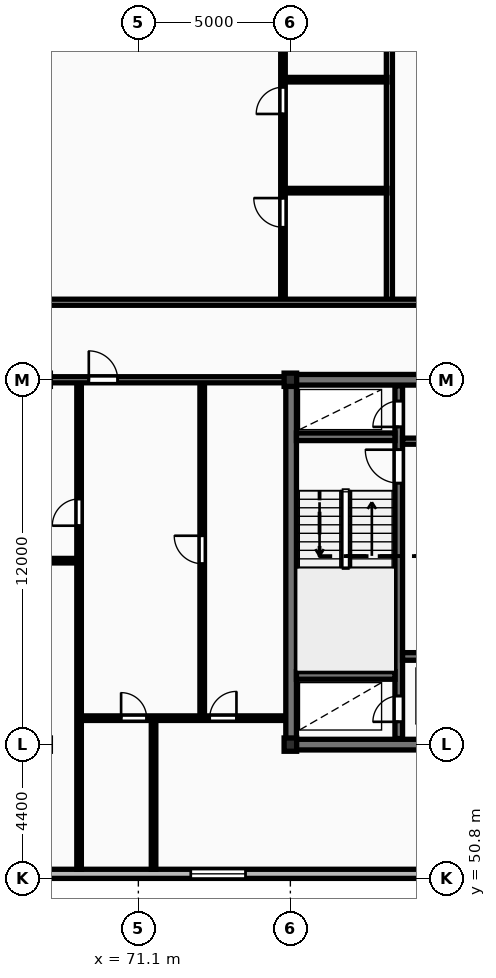
"""IFC4 building model, lengths in metres.
Left out: names, types, materials, properties, quantities, classifications, styles, units other than length and angle.
Written with IfcOpenShell. Run it as: python <this file> out.ifc"""

import sys

from ifc_helpers import new_model, si_unit, direction, frame, frame_2d, origin, origin_2d, place, context, subcontext, project, spatial, rectangle, i_section, extrude, element, fill, save


model = new_model("IFC4")
c1 = context("Model", 3, precision=1e-05, world=origin(), true_north=direction((0.0, 1.0)))
c2 = subcontext(c1, "Body", "Model", "MODEL_VIEW")
j1 = project(units=[si_unit("LENGTHUNIT", "METRE"), si_unit("PLANEANGLEUNIT", "RADIAN")], contexts=[c1])
p1 = place(None, origin())
s1 = spatial("IfcSite", under=j1, at=p1, CompositionType="ELEMENT")
p2 = place(p1, origin())
s2 = spatial("IfcBuilding", under=s1, at=p2, CompositionType="ELEMENT")
p3 = place(p2, frame((0.0, 0.0, 150.1)))
s3 = spatial("IfcBuildingStorey", under=s2, at=p3, CompositionType="ELEMENT", Elevation=150.1)
for number, where, z_axis, x_axis in (
    (1, (76.1, 55.2, 0.0), (0.0, 0.0, 1.0), (1.0, 0.0, 0.0)),
    (2, (76.1, 67.2, 0.0), (0.0, 0.0, 1.0), (1.0, 0.0, 0.0)),
):
    element("IfcColumn", number, at=place(p3, frame(where, z_axis=z_axis, x_axis=x_axis)), inside=s3, PredefinedType="COLUMN", context=c2, shape_type="SweptSolid", body=[
        extrude(i_section(OverallWidth=0.412, OverallDepth=0.437, WebThickness=0.036, FlangeThickness=0.052, FilletRadius=0.015, at=origin_2d()), origin(), (0.0, 0.0, 1.0), 3.6),
    ])
p4 = place(p3, frame((57.6, 50.95, 0.0), z_axis=(0.0, 0.0, 1.0), x_axis=(1.0, 0.0, 0.0)))
e3 = element("IfcWall", 3, at=p4, inside=s3, PredefinedType="STANDARD", context=c2, shape_type="SweptSolid", body=[
    extrude(rectangle(XDim=73.0, YDim=0.3, at=frame_2d((36.5, 0.0))), origin(), (0.0, 0.0, 1.0), 3.31),
])
p5 = place(p4, frame((15.225, 0.0, 0.85)))
e4 = element("IfcOpeningElement", 4, at=p5, cuts=e3, PredefinedType="OPENING", context=c2, shape_type="SweptSolid", body=[
    extrude(rectangle(XDim=1.8, YDim=1.8, at=frame_2d((0.9, 0.9))), frame((0.0, 0.16, 0.0), z_axis=(0.0, -1.0, 0.0), x_axis=(1.0, 0.0, 0.0)), (0.0, 0.0, 1.0), 0.32),
])
p6 = place(p4, frame((58.575, 0.0, 0.85)))
e5 = element("IfcOpeningElement", 5, at=p6, cuts=e3, PredefinedType="OPENING", context=c2, shape_type="SweptSolid", body=[
    extrude(rectangle(XDim=1.8, YDim=1.8, at=frame_2d((0.9, 0.9))), frame((0.0, 0.16, 0.0), z_axis=(0.0, -1.0, 0.0), x_axis=(1.0, 0.0, 0.0)), (0.0, 0.0, 1.0), 0.32),
])
p7 = place(p4, frame((33.45, 0.0, 0.0)))
e6 = element("IfcOpeningElement", 6, at=p7, cuts=e3, PredefinedType="OPENING", context=c2, shape_type="SweptSolid", body=[
    extrude(rectangle(XDim=1.1, YDim=2.1, at=frame_2d((0.55, 1.05))), frame((0.0, 0.16, 0.0), z_axis=(0.0, -1.0, 0.0), x_axis=(1.0, 0.0, 0.0)), (0.0, 0.0, 1.0), 0.32),
])
p8 = place(p3, frame((75.95, 55.2, 0.0), z_axis=(0.0, 0.0, 1.0), x_axis=(1.0, 0.0, 0.0)))
e7 = element("IfcWall", 7, at=p8, inside=s3, PredefinedType="SHEAR", context=c2, shape_type="SweptSolid", body=[
    extrude(rectangle(XDim=36.3, YDim=0.35, at=frame_2d((18.15, 0.0))), origin(), (0.0, 0.0, 1.0), 3.6),
])
p9 = place(p8, frame((15.1, 0.0, 0.0)))
e8 = element("IfcOpeningElement", 8, at=p9, cuts=e7, PredefinedType="OPENING", context=c2, shape_type="SweptSolid", body=[
    extrude(rectangle(XDim=1.1, YDim=2.1, at=frame_2d((0.55, 1.05))), frame((0.0, 0.185, 0.0), z_axis=(0.0, -1.0, 0.0), x_axis=(1.0, 0.0, 0.0)), (0.0, 0.0, 1.0), 0.37),
])
p10 = place(p3, frame((76.125, 55.375, 0.0), z_axis=(0.0, 0.0, 1.0), x_axis=(0.0, 1.0, 0.0)))
e9 = element("IfcWall", 9, at=p10, inside=s3, PredefinedType="SHEAR", context=c2, shape_type="SweptSolid", body=[
    extrude(rectangle(XDim=11.65, YDim=0.35, at=frame_2d((5.825, 0.0))), origin(), (0.0, 0.0, 1.0), 3.6),
])
p11 = place(p3, frame((75.95, 67.2, 0.0), z_axis=(0.0, 0.0, 1.0), x_axis=(1.0, 0.0, 0.0)))
e10 = element("IfcWall", 10, at=p11, inside=s3, PredefinedType="SHEAR", context=c2, shape_type="SweptSolid", body=[
    extrude(rectangle(XDim=36.3, YDim=0.35, at=frame_2d((18.15, 0.0))), origin(), (0.0, 0.0, 1.0), 3.6),
])
p12 = place(p11, frame((5.25, 0.0, 0.0)))
e11 = element("IfcOpeningElement", 11, at=p12, cuts=e10, PredefinedType="OPENING", context=c2, shape_type="SweptSolid", body=[
    extrude(rectangle(XDim=1.0, YDim=2.15, at=frame_2d((0.5, 1.075))), frame((0.0, 0.185, 0.0), z_axis=(0.0, -1.0, 0.0), x_axis=(1.0, 0.0, 0.0)), (0.0, 0.0, 1.0), 0.37),
])
p13 = place(p11, frame((21.6, 0.0, 0.0)))
e12 = element("IfcOpeningElement", 12, at=p13, cuts=e10, PredefinedType="OPENING", context=c2, shape_type="SweptSolid", body=[
    extrude(rectangle(XDim=1.5, YDim=2.2, at=frame_2d((0.75, 1.1))), frame((0.0, 0.185, 0.0), z_axis=(0.0, -1.0, 0.0), x_axis=(1.0, 0.0, 0.0)), (0.0, 0.0, 1.0), 0.37),
])
p14 = place(p11, frame((30.45, 0.0, 0.0)))
e13 = element("IfcOpeningElement", 13, at=p14, cuts=e10, PredefinedType="OPENING", context=c2, shape_type="SweptSolid", body=[
    extrude(rectangle(XDim=1.0, YDim=2.15, at=frame_2d((0.5, 1.075))), frame((0.0, 0.185, 0.0), z_axis=(0.0, -1.0, 0.0), x_axis=(1.0, 0.0, 0.0)), (0.0, 0.0, 1.0), 0.37),
])
p15 = place(p3, frame((79.665, 55.4, 0.0), z_axis=(0.0, 0.0, 1.0), x_axis=(0.0, 1.0, 0.0)))
e14 = element("IfcWall", 14, at=p15, inside=s3, PredefinedType="SHEAR", context=c2, shape_type="SweptSolid", body=[
    extrude(rectangle(XDim=11.6, YDim=0.25, at=frame_2d((5.8, 0.0))), origin(), (0.0, 0.0, 1.0), 3.6),
])
p16 = place(p15, frame((0.55, 0.0, 0.0)))
e15 = element("IfcOpeningElement", 15, at=p16, cuts=e14, PredefinedType="OPENING", context=c2, shape_type="SweptSolid", body=[
    extrude(rectangle(XDim=0.85, YDim=2.05, at=frame_2d((0.425, 1.025))), frame((0.0, 0.135, 0.0), z_axis=(0.0, -1.0, 0.0), x_axis=(1.0, 0.0, 0.0)), (0.0, 0.0, 1.0), 0.27),
])
p17 = place(p15, frame((8.4, 0.0, 0.0)))
e16 = element("IfcOpeningElement", 16, at=p17, cuts=e14, PredefinedType="OPENING", context=c2, shape_type="SweptSolid", body=[
    extrude(rectangle(XDim=1.1, YDim=2.1, at=frame_2d((0.55, 1.05))), frame((0.0, 0.135, 0.0), z_axis=(0.0, -1.0, 0.0), x_axis=(1.0, 0.0, 0.0)), (0.0, 0.0, 1.0), 0.27),
])
p18 = place(p15, frame((10.25, 0.0, 0.0)))
e17 = element("IfcOpeningElement", 17, at=p18, cuts=e14, PredefinedType="OPENING", context=c2, shape_type="SweptSolid", body=[
    extrude(rectangle(XDim=0.85, YDim=2.05, at=frame_2d((0.425, 1.025))), frame((0.0, 0.135, 0.0), z_axis=(0.0, -1.0, 0.0), x_axis=(1.0, 0.0, 0.0)), (0.0, 0.0, 1.0), 0.27),
])
for number, where, z_axis, x_axis in (
    (18, (76.3, 57.475, 0.0), (0.0, 0.0, 1.0), (1.0, 0.0, 0.0)),
    (19, (76.3, 65.325, 0.0), (0.0, 0.0, 1.0), (1.0, 0.0, 0.0)),
):
    element("IfcWall", number, at=place(p3, frame(where, z_axis=z_axis, x_axis=x_axis)), inside=s3, PredefinedType="SHEAR", context=c2, shape_type="SweptSolid", body=[
        extrude(rectangle(XDim=3.24, YDim=0.25, at=frame_2d((1.62, 0.0))), origin(), (0.0, 0.0, 1.0), 3.6),
    ])
p19 = place(p3, frame((79.79, 58.1, 0.0), z_axis=(0.0, 0.0, 1.0), x_axis=(1.0, 0.0, 0.0)))
e20 = element("IfcWall", 20, at=p19, inside=s3, PredefinedType="SHEAR", context=c2, shape_type="SweptSolid", body=[
    extrude(rectangle(XDim=4.39, YDim=0.25, at=frame_2d((2.195, 0.0))), origin(), (0.0, 0.0, 1.0), 3.6),
])
p20 = place(p19, frame((1.05, 0.0, 0.0)))
e21 = element("IfcOpeningElement", 21, at=p20, cuts=e20, PredefinedType="OPENING", context=c2, shape_type="SweptSolid", body=[
    extrude(rectangle(XDim=1.12, YDim=2.12, at=frame_2d((0.56, 1.06))), frame((0.0, 0.135, 0.0), z_axis=(0.0, -1.0, 0.0), x_axis=(1.0, 0.0, 0.0)), (0.0, 0.0, 1.0), 0.27),
])
p21 = place(p19, frame((3.26, 0.0, 0.0)))
e22 = element("IfcOpeningElement", 22, at=p21, cuts=e20, PredefinedType="OPENING", context=c2, shape_type="SweptSolid", body=[
    extrude(rectangle(XDim=0.85, YDim=2.05, at=frame_2d((0.425, 1.025))), frame((0.0, 0.135, 0.0), z_axis=(0.0, -1.0, 0.0), x_axis=(1.0, 0.0, 0.0)), (0.0, 0.0, 1.0), 0.27),
])
p22 = place(p3, frame((79.79, 65.18, 0.0), z_axis=(0.0, 0.0, 1.0), x_axis=(1.0, 0.0, 0.0)))
e23 = element("IfcWall", 23, at=p22, inside=s3, PredefinedType="PARTITIONING", context=c2, shape_type="SweptSolid", body=[
    extrude(rectangle(XDim=4.39, YDim=0.2, at=frame_2d((2.195, 0.0))), origin(), (0.0, 0.0, 1.0), 3.31),
])
p23 = place(p22, frame((1.5, 0.0, 0.0)))
e24 = element("IfcOpeningElement", 24, at=p23, cuts=e23, PredefinedType="OPENING", context=c2, shape_type="SweptSolid", body=[
    extrude(rectangle(XDim=1.1, YDim=2.1, at=frame_2d((0.55, 1.05))), frame((0.0, 0.11, 0.0), z_axis=(0.0, -1.0, 0.0), x_axis=(1.0, 0.0, 0.0)), (0.0, 0.0, 1.0), 0.22),
])
p24 = place(p3, frame((57.6, 61.25, 0.0), z_axis=(0.0, 0.0, 1.0), x_axis=(1.0, 0.0, 0.0)))
e25 = element("IfcWall", 25, at=p24, inside=s3, PredefinedType="PARTITIONING", context=c2, shape_type="SweptSolid", body=[
    extrude(rectangle(XDim=11.55, YDim=0.15, at=frame_2d((5.775, 0.0))), origin(), (0.0, 0.0, 1.0), 3.31),
])
p25 = place(p24, frame((5.355, 0.0, 0.0)))
e26 = element("IfcOpeningElement", 26, at=p25, cuts=e25, PredefinedType="OPENING", context=c2, shape_type="SweptSolid", body=[
    extrude(rectangle(XDim=0.84, YDim=2.04, at=frame_2d((0.42, 1.02))), frame((0.0, 0.085, 0.0), z_axis=(0.0, -1.0, 0.0), x_axis=(1.0, 0.0, 0.0)), (0.0, 0.0, 1.0), 0.17),
])
p26 = place(p3, frame((69.15, 51.1, 0.0), z_axis=(0.0, 0.0, 1.0), x_axis=(0.0, 1.0, 0.0)))
e27 = element("IfcWall", 27, at=p26, inside=s3, PredefinedType="PARTITIONING", context=c2, shape_type="SweptSolid", body=[
    extrude(rectangle(XDim=16.05, YDim=0.15, at=frame_2d((8.025, 0.0))), origin(), (0.0, 0.0, 1.0), 3.31),
])
p27 = place(p26, frame((11.3, 0.0, 0.0)))
e28 = element("IfcOpeningElement", 28, at=p27, cuts=e27, PredefinedType="OPENING", context=c2, shape_type="SweptSolid", body=[
    extrude(rectangle(XDim=0.88, YDim=2.06, at=frame_2d((0.44, 1.03))), frame((0.0, 0.085, 0.0), z_axis=(0.0, -1.0, 0.0), x_axis=(1.0, 0.0, 0.0)), (0.0, 0.0, 1.0), 0.17),
])
p28 = place(p3, frame((73.2, 56.07, 0.0), z_axis=(0.0, 0.0, 1.0), x_axis=(0.0, 1.0, 0.0)))
e29 = element("IfcWall", 29, at=p28, inside=s3, PredefinedType="PARTITIONING", context=c2, shape_type="SweptSolid", body=[
    extrude(rectangle(XDim=11.08, YDim=0.15, at=frame_2d((5.54, 0.0))), origin(), (0.0, 0.0, 1.0), 3.31),
])
p29 = place(p28, frame((5.08, 0.0, 0.0)))
e30 = element("IfcOpeningElement", 30, at=p29, cuts=e29, PredefinedType="OPENING", context=c2, shape_type="SweptSolid", body=[
    extrude(rectangle(XDim=0.92, YDim=2.08, at=frame_2d((0.46, 1.04))), frame((0.0, 0.085, 0.0), z_axis=(0.0, -1.0, 0.0), x_axis=(1.0, 0.0, 0.0)), (0.0, 0.0, 1.0), 0.17),
])
p30 = place(p3, frame((71.6, 51.1, 0.0), z_axis=(0.0, 0.0, 1.0), x_axis=(0.0, 1.0, 0.0)))
e31 = element("IfcWall", 31, at=p30, inside=s3, PredefinedType="PARTITIONING", context=c2, shape_type="SweptSolid", body=[
    extrude(rectangle(XDim=4.97, YDim=0.15, at=frame_2d((2.485, 0.0))), origin(), (0.0, 0.0, 1.0), 3.31),
])
p31 = place(p3, frame((69.17, 56.07, 0.0), z_axis=(0.0, 0.0, 1.0), x_axis=(1.0, 0.0, 0.0)))
e32 = element("IfcWall", 32, at=p31, inside=s3, PredefinedType="PARTITIONING", context=c2, shape_type="SweptSolid", body=[
    extrude(rectangle(XDim=6.76, YDim=0.15, at=frame_2d((3.38, 0.0))), origin(), (0.0, 0.0, 1.0), 3.31),
])
p32 = place(p31, frame((1.362, 0.0, 0.0)))
e33 = element("IfcOpeningElement", 33, at=p32, cuts=e32, PredefinedType="OPENING", context=c2, shape_type="SweptSolid", body=[
    extrude(rectangle(XDim=0.84, YDim=2.04, at=frame_2d((0.42, 1.02))), frame((0.0, 0.085, 0.0), z_axis=(0.0, -1.0, 0.0), x_axis=(1.0, 0.0, 0.0)), (0.0, 0.0, 1.0), 0.17),
])
p33 = place(p31, frame((4.277, 0.0, 0.0)))
e34 = element("IfcOpeningElement", 34, at=p33, cuts=e32, PredefinedType="OPENING", context=c2, shape_type="SweptSolid", body=[
    extrude(rectangle(XDim=0.88, YDim=2.06, at=frame_2d((0.44, 1.03))), frame((0.0, 0.085, 0.0), z_axis=(0.0, -1.0, 0.0), x_axis=(1.0, 0.0, 0.0)), (0.0, 0.0, 1.0), 0.17),
])
p34 = place(p3, frame((57.6, 67.2, 0.0), z_axis=(0.0, 0.0, 1.0), x_axis=(1.0, 0.0, 0.0)))
e35 = element("IfcWall", 35, at=p34, inside=s3, PredefinedType="PARTITIONING", context=c2, shape_type="SweptSolid", body=[
    extrude(rectangle(XDim=18.35, YDim=0.2, at=frame_2d((9.175, 0.0))), origin(), (0.0, 0.0, 1.0), 2.773),
])
p35 = place(p34, frame((11.87, 0.0, 0.0)))
e36 = element("IfcOpeningElement", 36, at=p35, cuts=e35, PredefinedType="OPENING", context=c2, shape_type="SweptSolid", body=[
    extrude(rectangle(XDim=0.95, YDim=2.15, at=frame_2d((0.475, 1.075))), frame((0.0, 0.11, 0.0), z_axis=(0.0, -1.0, 0.0), x_axis=(1.0, 0.0, 0.0)), (0.0, 0.0, 1.0), 0.22),
])
p36 = place(p3, frame((79.357, 69.83, 0.0), z_axis=(0.0, 0.0, 1.0), x_axis=(0.0, 1.0, 0.0)))
e37 = element("IfcWall", 37, at=p36, inside=s3, PredefinedType="PARTITIONING", context=c2, shape_type="SweptSolid", body=[
    extrude(rectangle(XDim=26.07, YDim=0.2, at=frame_2d((13.035, 0.0))), origin(), (0.0, 0.0, 1.0), 3.31),
])
for number, where, z_axis, x_axis in (
    (38, (75.917, 73.42, 0.0), (0.0, 0.0, 1.0), (1.0, 0.0, 0.0)),
    (39, (75.917, 77.07, 0.0), (0.0, 0.0, 1.0), (1.0, 0.0, 0.0)),
):
    element("IfcWall", number, at=place(p3, frame(where, z_axis=z_axis, x_axis=x_axis)), inside=s3, PredefinedType="PARTITIONING", context=c2, shape_type="SweptSolid", body=[
        extrude(rectangle(XDim=3.36, YDim=0.15, at=frame_2d((1.68, 0.0))), origin(), (0.0, 0.0, 1.0), 3.31),
    ])
p37 = place(p3, frame((75.857, 69.81, 0.0), z_axis=(0.0, 0.0, 1.0), x_axis=(0.0, 1.0, 0.0)))
e40 = element("IfcWall", 40, at=p37, inside=s3, PredefinedType="PARTITIONING", context=c2, shape_type="SweptSolid", body=[
    extrude(rectangle(XDim=21.48, YDim=0.15, at=frame_2d((10.74, 0.0))), origin(), (0.0, 0.0, 1.0), 2.617),
])
p38 = place(p37, frame((2.406, 0.0, 0.0)))
e41 = element("IfcOpeningElement", 41, at=p38, cuts=e40, PredefinedType="OPENING", context=c2, shape_type="SweptSolid", body=[
    extrude(rectangle(XDim=0.96, YDim=2.1, at=frame_2d((0.48, 1.05))), frame((0.0, 0.085, 0.0), z_axis=(0.0, -1.0, 0.0), x_axis=(1.0, 0.0, 0.0)), (0.0, 0.0, 1.0), 0.17),
])
p39 = place(p37, frame((6.133, 0.0, 0.0)))
e42 = element("IfcOpeningElement", 42, at=p39, cuts=e40, PredefinedType="OPENING", context=c2, shape_type="SweptSolid", body=[
    extrude(rectangle(XDim=0.88, YDim=2.06, at=frame_2d((0.44, 1.03))), frame((0.0, 0.085, 0.0), z_axis=(0.0, -1.0, 0.0), x_axis=(1.0, 0.0, 0.0)), (0.0, 0.0, 1.0), 0.17),
])
p40 = place(p37, frame((11.336, 0.0, 0.0)))
e43 = element("IfcOpeningElement", 43, at=p40, cuts=e40, PredefinedType="OPENING", context=c2, shape_type="SweptSolid", body=[
    extrude(rectangle(XDim=0.84, YDim=2.04, at=frame_2d((0.42, 1.02))), frame((0.0, 0.085, 0.0), z_axis=(0.0, -1.0, 0.0), x_axis=(1.0, 0.0, 0.0)), (0.0, 0.0, 1.0), 0.17),
])
p41 = place(p3, frame((57.6, 69.75, 0.0), z_axis=(0.0, 0.0, 1.0), x_axis=(1.0, 0.0, 0.0)))
e44 = element("IfcWall", 44, at=p41, inside=s3, PredefinedType="PARTITIONING", context=c2, shape_type="SweptSolid", body=[
    extrude(rectangle(XDim=73.0, YDim=0.2, at=frame_2d((36.5, 0.0))), origin(), (0.0, 0.0, 1.0), 3.31),
])
p42 = place(p41, frame((9.189, 0.0, 0.0)))
e45 = element("IfcOpeningElement", 45, at=p42, cuts=e44, PredefinedType="OPENING", context=c2, shape_type="SweptSolid", body=[
    extrude(rectangle(XDim=1.22, YDim=2.18, at=frame_2d((0.61, 1.09))), frame((0.0, 0.11, 0.0), z_axis=(0.0, -1.0, 0.0), x_axis=(1.0, 0.0, 0.0)), (0.0, 0.0, 1.0), 0.22),
])
p43 = place(p41, frame((29.912, 0.0, 0.0)))
e46 = element("IfcOpeningElement", 46, at=p43, cuts=e44, PredefinedType="OPENING", context=c2, shape_type="SweptSolid", body=[
    extrude(rectangle(XDim=1.22, YDim=2.18, at=frame_2d((0.61, 1.09))), frame((0.0, 0.11, 0.0), z_axis=(0.0, -1.0, 0.0), x_axis=(1.0, 0.0, 0.0)), (0.0, 0.0, 1.0), 0.22),
])
p44 = place(p41, frame((49.457, 0.0, 0.0)))
e47 = element("IfcOpeningElement", 47, at=p44, cuts=e44, PredefinedType="OPENING", context=c2, shape_type="SweptSolid", body=[
    extrude(rectangle(XDim=1.22, YDim=2.18, at=frame_2d((0.61, 1.09))), frame((0.0, 0.11, 0.0), z_axis=(0.0, -1.0, 0.0), x_axis=(1.0, 0.0, 0.0)), (0.0, 0.0, 1.0), 0.22),
])
p45 = place(p41, frame((63.122, 0.0, 0.0)))
e48 = element("IfcOpeningElement", 48, at=p45, cuts=e44, PredefinedType="OPENING", context=c2, shape_type="SweptSolid", body=[
    extrude(rectangle(XDim=0.95, YDim=2.15, at=frame_2d((0.475, 1.075))), frame((0.0, 0.11, 0.0), z_axis=(0.0, -1.0, 0.0), x_axis=(1.0, 0.0, 0.0)), (0.0, 0.0, 1.0), 0.22),
])
p46 = place(p5, origin())
e49 = element("IfcWindow", 49, at=p46, inside=s3, PartitioningType="SINGLE_PANEL", PredefinedType="WINDOW", context=c2, shape_type="SweptSolid", body=[
    extrude(rectangle(XDim=1.8, YDim=1.8, at=frame_2d((0.9, 0.9))), frame((0.0, 0.03, 0.0), z_axis=(0.0, -1.0, 0.0), x_axis=(1.0, 0.0, 0.0)), (0.0, 0.0, 1.0), 0.06),
])
fill(e4, e49)
p47 = place(p16, origin())
e50 = element("IfcDoor", 50, at=p47, inside=s3, OperationType="SINGLE_SWING_LEFT", PredefinedType="DOOR", context=c2, shape_type="SweptSolid", body=[
    extrude(rectangle(XDim=0.85, YDim=2.05, at=frame_2d((0.425, 1.025))), frame((0.0, 0.025, 0.0), z_axis=(0.0, -1.0, 0.0), x_axis=(1.0, 0.0, 0.0)), (0.0, 0.0, 1.0), 0.05),
])
fill(e15, e50)
p48 = place(p17, origin())
e51 = element("IfcDoor", 51, at=p48, inside=s3, OperationType="SINGLE_SWING_RIGHT", PredefinedType="DOOR", context=c2, shape_type="SweptSolid", body=[
    extrude(rectangle(XDim=1.1, YDim=2.1, at=frame_2d((0.55, 1.05))), frame((0.0, 0.025, 0.0), z_axis=(0.0, -1.0, 0.0), x_axis=(1.0, 0.0, 0.0)), (0.0, 0.0, 1.0), 0.05),
])
fill(e16, e51)
p49 = place(p18, origin())
e52 = element("IfcDoor", 52, at=p49, inside=s3, OperationType="SINGLE_SWING_LEFT", PredefinedType="DOOR", context=c2, shape_type="SweptSolid", body=[
    extrude(rectangle(XDim=0.85, YDim=2.05, at=frame_2d((0.425, 1.025))), frame((0.0, 0.025, 0.0), z_axis=(0.0, -1.0, 0.0), x_axis=(1.0, 0.0, 0.0)), (0.0, 0.0, 1.0), 0.05),
])
fill(e17, e52)
p50 = place(p27, origin())
e53 = element("IfcDoor", 53, at=p50, inside=s3, OperationType="SINGLE_SWING_LEFT", PredefinedType="DOOR", context=c2, shape_type="SweptSolid", body=[
    extrude(rectangle(XDim=0.88, YDim=2.06, at=frame_2d((0.44, 1.03))), frame((0.0, 0.025, 0.0), z_axis=(0.0, -1.0, 0.0), x_axis=(1.0, 0.0, 0.0)), (0.0, 0.0, 1.0), 0.05),
])
fill(e28, e53)
p51 = place(p29, origin())
e54 = element("IfcDoor", 54, at=p51, inside=s3, OperationType="SINGLE_SWING_RIGHT", PredefinedType="DOOR", context=c2, shape_type="SweptSolid", body=[
    extrude(rectangle(XDim=0.92, YDim=2.08, at=frame_2d((0.46, 1.04))), frame((0.0, 0.025, 0.0), z_axis=(0.0, -1.0, 0.0), x_axis=(1.0, 0.0, 0.0)), (0.0, 0.0, 1.0), 0.05),
])
fill(e30, e54)
p52 = place(p32, origin())
e55 = element("IfcDoor", 55, at=p52, inside=s3, OperationType="SINGLE_SWING_LEFT", PredefinedType="DOOR", context=c2, shape_type="SweptSolid", body=[
    extrude(rectangle(XDim=0.84, YDim=2.04, at=frame_2d((0.42, 1.02))), frame((0.0, 0.025, 0.0), z_axis=(0.0, -1.0, 0.0), x_axis=(1.0, 0.0, 0.0)), (0.0, 0.0, 1.0), 0.05),
])
fill(e33, e55)
p53 = place(p33, origin())
e56 = element("IfcDoor", 56, at=p53, inside=s3, OperationType="SINGLE_SWING_RIGHT", PredefinedType="DOOR", context=c2, shape_type="SweptSolid", body=[
    extrude(rectangle(XDim=0.88, YDim=2.06, at=frame_2d((0.44, 1.03))), frame((0.0, 0.025, 0.0), z_axis=(0.0, -1.0, 0.0), x_axis=(1.0, 0.0, 0.0)), (0.0, 0.0, 1.0), 0.05),
])
fill(e34, e56)
p54 = place(p35, origin())
e57 = element("IfcDoor", 57, at=p54, inside=s3, OperationType="SINGLE_SWING_LEFT", PredefinedType="DOOR", context=c2, shape_type="SweptSolid", body=[
    extrude(rectangle(XDim=0.95, YDim=2.15, at=frame_2d((0.475, 1.075))), frame((0.0, 0.025, 0.0), z_axis=(0.0, -1.0, 0.0), x_axis=(1.0, 0.0, 0.0)), (0.0, 0.0, 1.0), 0.05),
])
fill(e36, e57)
p55 = place(p38, origin())
e58 = element("IfcDoor", 58, at=p55, inside=s3, OperationType="SINGLE_SWING_RIGHT", PredefinedType="DOOR", context=c2, shape_type="SweptSolid", body=[
    extrude(rectangle(XDim=0.96, YDim=2.1, at=frame_2d((0.48, 1.05))), frame((0.0, 0.025, 0.0), z_axis=(0.0, -1.0, 0.0), x_axis=(1.0, 0.0, 0.0)), (0.0, 0.0, 1.0), 0.05),
])
fill(e41, e58)
p56 = place(p39, origin())
e59 = element("IfcDoor", 59, at=p56, inside=s3, OperationType="SINGLE_SWING_LEFT", PredefinedType="DOOR", context=c2, shape_type="SweptSolid", body=[
    extrude(rectangle(XDim=0.88, YDim=2.06, at=frame_2d((0.44, 1.03))), frame((0.0, 0.025, 0.0), z_axis=(0.0, -1.0, 0.0), x_axis=(1.0, 0.0, 0.0)), (0.0, 0.0, 1.0), 0.05),
])
fill(e42, e59)
save(model, sys.argv[1])
